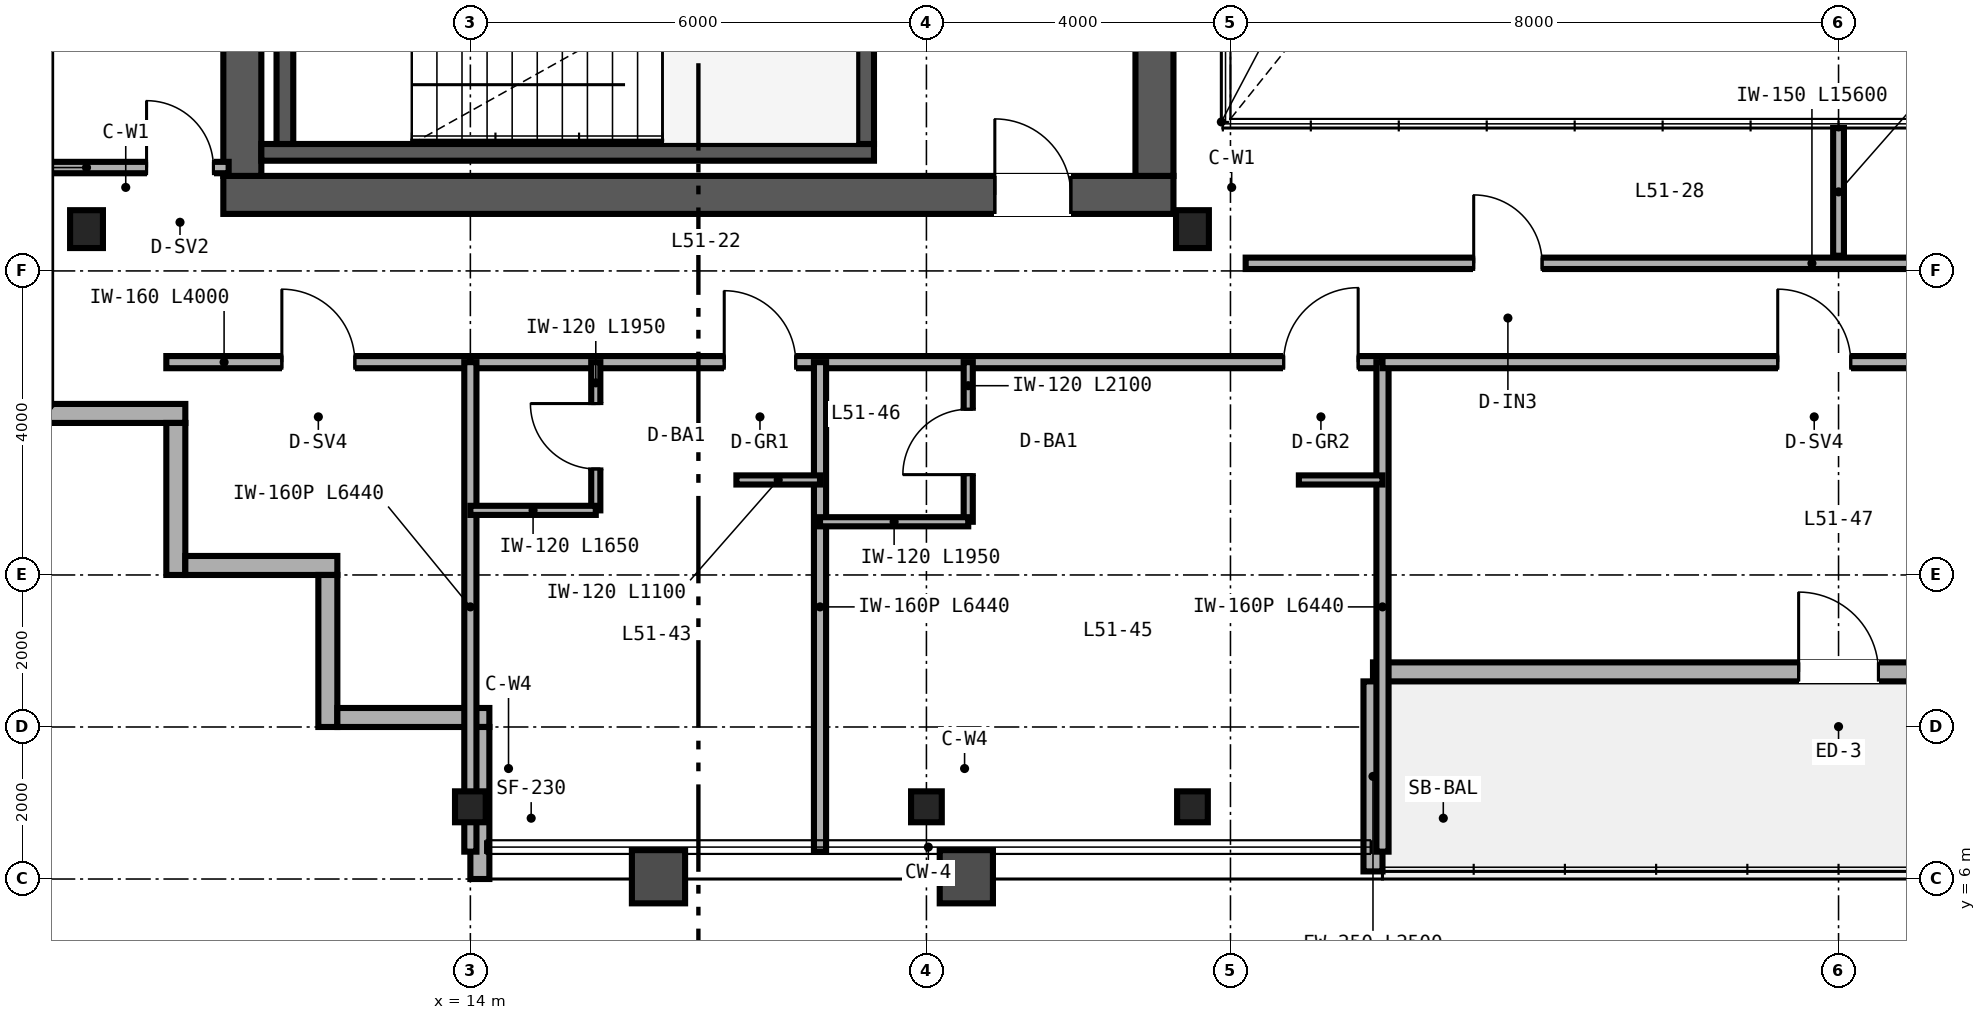
"""IFC4 building model, lengths in metres.
Left out: names, types, materials, properties, quantities, classifications, styles, units other than length and angle.
Written with IfcOpenShell. Run it as: python <this file> out.ifc"""

import sys

from ifc_helpers import new_model, si_unit, direction, frame, frame_2d, origin, origin_2d, place, context, subcontext, project, spatial, rectangle, i_section, extrude, source, transform, mapped, element, fill, save


model = new_model("IFC4")
c1 = context("Model", 3, precision=1e-05, world=origin(), true_north=direction((0.0, 1.0)))
c2 = subcontext(c1, "Body", "Model", "MODEL_VIEW")
j1 = project(units=[si_unit("LENGTHUNIT", "METRE"), si_unit("PLANEANGLEUNIT", "RADIAN")], contexts=[c1])
p1 = place(None, origin())
s1 = spatial("IfcSite", under=j1, at=p1, CompositionType="ELEMENT")
p2 = place(p1, origin())
s2 = spatial("IfcBuilding", under=s1, at=p2, CompositionType="ELEMENT")
p3 = place(p2, frame((0.0, 0.0, 202.8)))
s3 = spatial("IfcBuildingStorey", under=s2, at=p3, CompositionType="ELEMENT", Elevation=202.8)
p4 = place(p3, frame((10.75, 15.0, 0.0), z_axis=(0.0, 0.0, 1.0), x_axis=(1.0, 0.0, 0.0)))
e1 = element("IfcWall", 1, at=p4, inside=s3, PredefinedType="SHEAR", context=c2, shape_type="SweptSolid", body=[
    extrude(rectangle(XDim=12.5, YDim=0.5, at=frame_2d((6.25, 0.0))), origin(), (0.0, 0.0, 1.0), 3.37),
])
p5 = place(p4, frame((10.15, 0.0, 0.0)))
e2 = element("IfcOpeningElement", 2, at=p5, cuts=e1, PredefinedType="OPENING", context=c2, shape_type="SweptSolid", body=[
    extrude(rectangle(XDim=1.0, YDim=2.15, at=frame_2d((0.5, 1.075))), frame((0.0, 0.26, 0.0), z_axis=(0.0, -1.0, 0.0), x_axis=(1.0, 0.0, 0.0)), (0.0, 0.0, 1.0), 0.52),
])
for number, where, z_axis, x_axis in (
    (3, (11.0, 15.25, 0.0), (0.0, 0.0, 1.0), (0.0, 1.0, 0.0)),
    (4, (23.0, 15.25, 0.0), (0.0, 0.0, 1.0), (0.0, 1.0, 0.0)),
):
    element("IfcWall", number, at=place(p3, frame(where, z_axis=z_axis, x_axis=x_axis)), inside=s3, PredefinedType="SHEAR", context=c2, shape_type="SweptSolid", body=[
        extrude(rectangle(XDim=21.5, YDim=0.5, at=frame_2d((10.75, 0.0))), origin(), (0.0, 0.0, 1.0), 3.37),
    ])
p6 = place(p3, frame((11.25, 15.56, 0.0), z_axis=(0.0, 0.0, 1.0), x_axis=(1.0, 0.0, 0.0)))
e5 = element("IfcWall", 5, at=p6, inside=s3, PredefinedType="SHEAR", context=c2, shape_type="SweptSolid", body=[
    extrude(rectangle(XDim=8.06, YDim=0.22, at=frame_2d((4.03, 0.0))), origin(), (0.0, 0.0, 1.0), 3.4),
])
for number, where, z_axis, x_axis in (
    (6, (11.56, 15.67, 0.0), (0.0, 0.0, 1.0), (0.0, 1.0, 0.0)),
    (7, (19.2, 15.67, 0.0), (0.0, 0.0, 1.0), (0.0, 1.0, 0.0)),
):
    element("IfcWall", number, at=place(p3, frame(where, z_axis=z_axis, x_axis=x_axis)), inside=s3, PredefinedType="SHEAR", context=c2, shape_type="SweptSolid", body=[
        extrude(rectangle(XDim=3.28, YDim=0.22, at=frame_2d((1.64, 0.0))), origin(), (0.0, 0.0, 1.0), 3.4),
    ])
m1 = source(origin(), c2, "Body", "SweptSolid", [
    extrude(i_section(OverallWidth=0.432, OverallDepth=0.498, WebThickness=0.056, FlangeThickness=0.089, FilletRadius=0.025, at=origin_2d()), origin(), (0.0, 0.0, 1.0), 3.37),
])
for number, where, z_axis, x_axis in (
    (8, (8.95, 14.55, 0.0), (0.0, 0.0, 1.0), (1.0, 0.0, 0.0)),
    (9, (23.5, 14.55, 0.0), (0.0, 0.0, 1.0), (1.0, 0.0, 0.0)),
):
    element("IfcColumn", number, at=place(p3, frame(where, z_axis=z_axis, x_axis=x_axis)), inside=s3, PredefinedType="COLUMN", context=c2, shape_type="MappedRepresentation", body=[
        mapped(m1, transform((0.0, 0.0, 0.0), scale=1.0)),
    ])
m2 = source(origin(), c2, "Body", "SweptSolid", [
    extrude(i_section(OverallWidth=0.404, OverallDepth=0.407, WebThickness=0.027, FlangeThickness=0.044, FilletRadius=0.025, at=origin_2d()), origin(), (0.0, 0.0, 1.0), 3.37),
])
for number, where, z_axis, x_axis in (
    (10, (14.0, 6.95, 0.0), (0.0, 0.0, 1.0), (1.0, 0.0, 0.0)),
    (11, (20.0, 6.95, 0.0), (0.0, 0.0, 1.0), (1.0, 0.0, 0.0)),
    (12, (23.5, 6.95, 0.0), (0.0, 0.0, 1.0), (1.0, 0.0, 0.0)),
):
    element("IfcColumn", number, at=place(p3, frame(where, z_axis=z_axis, x_axis=x_axis)), inside=s3, PredefinedType="COLUMN", context=c2, shape_type="MappedRepresentation", body=[
        mapped(m2, transform((0.0, 0.0, 0.0), scale=1.0)),
    ])
p7 = place(p3, frame((8.0, 12.125, 0.0), z_axis=(0.0, 0.0, 1.0), x_axis=(1.0, 0.0, 0.0)))
e13 = element("IfcWall", 13, at=p7, inside=s3, PredefinedType="SOLIDWALL", context=c2, shape_type="SweptSolid", body=[
    extrude(rectangle(XDim=2.25, YDim=0.25, at=frame_2d((1.125, 0.0))), origin(), (0.0, 0.0, 1.0), 3.37),
])
for number, where, z_axis, x_axis in (
    (14, (10.125, 12.0, 0.0), (0.0, 0.0, 1.0), (0.0, -1.0, 0.0)),
    (15, (10.25, 10.125, 0.0), (0.0, 0.0, 1.0), (1.0, 0.0, 0.0)),
    (16, (12.125, 10.0, 0.0), (0.0, 0.0, 1.0), (0.0, -1.0, 0.0)),
    (17, (12.25, 8.125, 0.0), (0.0, 0.0, 1.0), (1.0, 0.0, 0.0)),
):
    element("IfcWall", number, at=place(p3, frame(where, z_axis=z_axis, x_axis=x_axis)), inside=s3, PredefinedType="SOLIDWALL", context=c2, shape_type="SweptSolid", body=[
        extrude(rectangle(XDim=2.0, YDim=0.25, at=frame_2d((1.0, 0.0))), origin(), (0.0, 0.0, 1.0), 3.37),
    ])
p8 = place(p3, frame((14.125, 8.0, 0.0), z_axis=(0.0, 0.0, 1.0), x_axis=(0.0, -1.0, 0.0)))
e18 = element("IfcWall", 18, at=p8, inside=s3, PredefinedType="SOLIDWALL", context=c2, shape_type="SweptSolid", body=[
    extrude(rectangle(XDim=2.0, YDim=0.25, at=frame_2d((1.0, 0.0))), origin(), (0.0, 0.0, 1.0), 2.677),
])
p9 = place(p3, frame((25.875, 8.725, 0.0), z_axis=(0.0, 0.0, 1.0), x_axis=(1.0, 0.0, 0.0)))
e19 = element("IfcWall", 19, at=p9, inside=s3, PredefinedType="SOLIDWALL", context=c2, shape_type="SweptSolid", body=[
    extrude(rectangle(XDim=12.25, YDim=0.25, at=frame_2d((6.125, 0.0))), origin(), (0.0, 0.0, 1.0), 3.37),
])
p10 = place(p9, frame((5.6, 0.0, 0.0)))
e20 = element("IfcOpeningElement", 20, at=p10, cuts=e19, PredefinedType="OPENING", context=c2, shape_type="SweptSolid", body=[
    extrude(rectangle(XDim=1.05, YDim=2.15, at=frame_2d((0.525, 1.075))), frame((0.0, 0.135, 0.0), z_axis=(0.0, -1.0, 0.0), x_axis=(1.0, 0.0, 0.0)), (0.0, 0.0, 1.0), 0.27),
])
p11 = place(p3, frame((25.875, 6.1, 0.0), z_axis=(0.0, 0.0, 1.0), x_axis=(0.0, 1.0, 0.0)))
e21 = element("IfcWall", 21, at=p11, inside=s3, PredefinedType="SOLIDWALL", context=c2, shape_type="SweptSolid", body=[
    extrude(rectangle(XDim=2.5, YDim=0.25, at=frame_2d((1.25, 0.0))), origin(), (0.0, 0.0, 1.0), 2.443),
])
p12 = place(p3, frame((24.2, 14.1, 0.0), z_axis=(0.0, 0.0, 1.0), x_axis=(1.0, 0.0, 0.0)))
e22 = element("IfcWall", 22, at=p12, inside=s3, PredefinedType="PARTITIONING", context=c2, shape_type="SweptSolid", body=[
    extrude(rectangle(XDim=15.6, YDim=0.15, at=frame_2d((7.8, 0.0))), origin(), (0.0, 0.0, 1.0), 3.37),
])
p13 = place(p12, frame((3.0, 0.0, 0.0)))
e23 = element("IfcOpeningElement", 23, at=p13, cuts=e22, PredefinedType="OPENING", context=c2, shape_type="SweptSolid", body=[
    extrude(rectangle(XDim=0.9, YDim=2.15, at=frame_2d((0.45, 1.075))), frame((0.0, 0.085, 0.0), z_axis=(0.0, -1.0, 0.0), x_axis=(1.0, 0.0, 0.0)), (0.0, 0.0, 1.0), 0.17),
])
p14 = place(p12, frame((11.0, 0.0, 0.0)))
e24 = element("IfcOpeningElement", 24, at=p14, cuts=e22, PredefinedType="OPENING", context=c2, shape_type="SweptSolid", body=[
    extrude(rectangle(XDim=0.9, YDim=2.15, at=frame_2d((0.45, 1.075))), frame((0.0, 0.085, 0.0), z_axis=(0.0, -1.0, 0.0), x_axis=(1.0, 0.0, 0.0)), (0.0, 0.0, 1.0), 0.17),
])
p15 = place(p3, frame((32.0, 14.2, 0.0), z_axis=(0.0, 0.0, 1.0), x_axis=(0.0, 1.0, 0.0)))
e25 = element("IfcWall", 25, at=p15, inside=s3, PredefinedType="PARTITIONING", context=c2, shape_type="SweptSolid", body=[
    extrude(rectangle(XDim=1.68, YDim=0.142, at=frame_2d((0.84, 0.0))), origin(), (0.0, 0.0, 1.0), 3.37),
])
p16 = place(p3, frame((8.16, 15.36, 0.0), z_axis=(0.0, 0.0, 1.0), x_axis=(1.0, 0.0, 0.0)))
e26 = element("IfcWall", 26, at=p16, inside=s3, PredefinedType="PARTITIONING", context=c2, shape_type="SweptSolid", body=[
    extrude(rectangle(XDim=2.66, YDim=0.15, at=frame_2d((1.33, 0.0))), origin(), (0.0, 0.0, 1.0), 2.591),
])
p17 = place(p16, frame((1.58, 0.0, 0.0)))
e27 = element("IfcOpeningElement", 27, at=p17, cuts=e26, PredefinedType="OPENING", context=c2, shape_type="SweptSolid", body=[
    extrude(rectangle(XDim=0.88, YDim=2.15, at=frame_2d((0.44, 1.075))), frame((0.0, 0.085, 0.0), z_axis=(0.0, -1.0, 0.0), x_axis=(1.0, 0.0, 0.0)), (0.0, 0.0, 1.0), 0.17),
])
p18 = place(p3, frame((10.0, 12.8, 0.0), z_axis=(0.0, 0.0, 1.0), x_axis=(1.0, 0.0, 0.0)))
e28 = element("IfcWall", 28, at=p18, inside=s3, PredefinedType="PARTITIONING", context=c2, shape_type="SweptSolid", body=[
    extrude(rectangle(XDim=4.0, YDim=0.16, at=frame_2d((2.0, 0.0))), origin(), (0.0, 0.0, 1.0), 3.37),
])
p19 = place(p18, frame((1.52, 0.0, 0.0)))
e29 = element("IfcOpeningElement", 29, at=p19, cuts=e28, PredefinedType="OPENING", context=c2, shape_type="SweptSolid", body=[
    extrude(rectangle(XDim=0.96, YDim=2.15, at=frame_2d((0.48, 1.075))), frame((0.0, 0.09, 0.0), z_axis=(0.0, -1.0, 0.0), x_axis=(1.0, 0.0, 0.0)), (0.0, 0.0, 1.0), 0.18),
])
p20 = place(p3, frame((14.0, 12.8, 0.0), z_axis=(0.0, 0.0, 1.0), x_axis=(1.0, 0.0, 0.0)))
e30 = element("IfcWall", 30, at=p20, inside=s3, PredefinedType="PARTITIONING", context=c2, shape_type="SweptSolid", body=[
    extrude(rectangle(XDim=12.0, YDim=0.16, at=frame_2d((6.0, 0.0))), origin(), (0.0, 0.0, 1.0), 2.913),
])
p21 = place(p20, frame((3.34, 0.0, 0.0)))
e31 = element("IfcOpeningElement", 31, at=p21, cuts=e30, PredefinedType="OPENING", context=c2, shape_type="SweptSolid", body=[
    extrude(rectangle(XDim=0.94, YDim=2.15, at=frame_2d((0.47, 1.075))), frame((0.0, 0.09, 0.0), z_axis=(0.0, -1.0, 0.0), x_axis=(1.0, 0.0, 0.0)), (0.0, 0.0, 1.0), 0.18),
])
p22 = place(p20, frame((10.7, 0.0, 0.0)))
e32 = element("IfcOpeningElement", 32, at=p22, cuts=e30, PredefinedType="OPENING", context=c2, shape_type="SweptSolid", body=[
    extrude(rectangle(XDim=0.98, YDim=2.2, at=frame_2d((0.49, 1.1))), frame((0.0, 0.09, 0.0), z_axis=(0.0, -1.0, 0.0), x_axis=(1.0, 0.0, 0.0)), (0.0, 0.0, 1.0), 0.18),
])
p23 = place(p3, frame((14.0, 6.36, 0.0), z_axis=(0.0, 0.0, 1.0), x_axis=(0.0, 1.0, 0.0)))
e33 = element("IfcWall", 33, at=p23, inside=s3, PredefinedType="PARTITIONING", context=c2, shape_type="SweptSolid", body=[
    extrude(rectangle(XDim=6.44, YDim=0.16, at=frame_2d((3.22, 0.0))), origin(), (0.0, 0.0, 1.0), 2.677),
])
p24 = place(p3, frame((26.0, 6.36, 0.0), z_axis=(0.0, 0.0, 1.0), x_axis=(0.0, 1.0, 0.0)))
e34 = element("IfcWall", 34, at=p24, inside=s3, PredefinedType="PARTITIONING", context=c2, shape_type="SweptSolid", body=[
    extrude(rectangle(XDim=6.44, YDim=0.16, at=frame_2d((3.22, 0.0))), origin(), (0.0, 0.0, 1.0), 2.443),
])
p25 = place(p3, frame((18.6, 6.36, 0.0), z_axis=(0.0, 0.0, 1.0), x_axis=(0.0, 1.0, 0.0)))
e35 = element("IfcWall", 35, at=p25, inside=s3, PredefinedType="PARTITIONING", context=c2, shape_type="SweptSolid", body=[
    extrude(rectangle(XDim=6.44, YDim=0.16, at=frame_2d((3.22, 0.0))), origin(), (0.0, 0.0, 1.0), 2.677),
])
p26 = place(p3, frame((15.65, 10.85, 0.0), z_axis=(0.0, 0.0, 1.0), x_axis=(0.0, 1.0, 0.0)))
e36 = element("IfcWall", 36, at=p26, inside=s3, PredefinedType="PARTITIONING", context=c2, shape_type="SweptSolid", body=[
    extrude(rectangle(XDim=1.95, YDim=0.12, at=frame_2d((0.975, 0.0))), origin(), (0.0, 0.0, 1.0), 3.37),
])
p27 = place(p26, frame((0.545, 0.0, 0.0)))
e37 = element("IfcOpeningElement", 37, at=p27, cuts=e36, PredefinedType="OPENING", context=c2, shape_type="SweptSolid", body=[
    extrude(rectangle(XDim=0.86, YDim=2.1, at=frame_2d((0.43, 1.05))), frame((0.0, 0.07, 0.0), z_axis=(0.0, -1.0, 0.0), x_axis=(1.0, 0.0, 0.0)), (0.0, 0.0, 1.0), 0.14),
])
p28 = place(p3, frame((14.0, 10.85, 0.0), z_axis=(0.0, 0.0, 1.0), x_axis=(1.0, 0.0, 0.0)))
e38 = element("IfcWall", 38, at=p28, inside=s3, PredefinedType="PARTITIONING", context=c2, shape_type="SweptSolid", body=[
    extrude(rectangle(XDim=1.65, YDim=0.12, at=frame_2d((0.825, 0.0))), origin(), (0.0, 0.0, 1.0), 3.37),
])
p29 = place(p3, frame((17.5, 11.25, 0.0), z_axis=(0.0, 0.0, 1.0), x_axis=(1.0, 0.0, 0.0)))
e39 = element("IfcWall", 39, at=p29, inside=s3, PredefinedType="PARTITIONING", context=c2, shape_type="SweptSolid", body=[
    extrude(rectangle(XDim=1.1, YDim=0.12, at=frame_2d((0.55, 0.0))), origin(), (0.0, 0.0, 1.0), 3.37),
])
p30 = place(p3, frame((20.55, 10.7, 0.0), z_axis=(0.0, 0.0, 1.0), x_axis=(0.0, 1.0, 0.0)))
e40 = element("IfcWall", 40, at=p30, inside=s3, PredefinedType="PARTITIONING", context=c2, shape_type="SweptSolid", body=[
    extrude(rectangle(XDim=2.1, YDim=0.12, at=frame_2d((1.05, 0.0))), origin(), (0.0, 0.0, 1.0), 3.37),
])
p31 = place(p30, frame((0.62, 0.0, 0.0)))
e41 = element("IfcOpeningElement", 41, at=p31, cuts=e40, PredefinedType="OPENING", context=c2, shape_type="SweptSolid", body=[
    extrude(rectangle(XDim=0.86, YDim=2.1, at=frame_2d((0.43, 1.05))), frame((0.0, 0.07, 0.0), z_axis=(0.0, -1.0, 0.0), x_axis=(1.0, 0.0, 0.0)), (0.0, 0.0, 1.0), 0.14),
])
p32 = place(p3, frame((18.6, 10.7, 0.0), z_axis=(0.0, 0.0, 1.0), x_axis=(1.0, 0.0, 0.0)))
e42 = element("IfcWall", 42, at=p32, inside=s3, PredefinedType="PARTITIONING", context=c2, shape_type="SweptSolid", body=[
    extrude(rectangle(XDim=1.95, YDim=0.12, at=frame_2d((0.975, 0.0))), origin(), (0.0, 0.0, 1.0), 3.37),
])
p33 = place(p3, frame((24.9, 11.25, 0.0), z_axis=(0.0, 0.0, 1.0), x_axis=(1.0, 0.0, 0.0)))
e43 = element("IfcWall", 43, at=p33, inside=s3, PredefinedType="PARTITIONING", context=c2, shape_type="SweptSolid", body=[
    extrude(rectangle(XDim=1.1, YDim=0.12, at=frame_2d((0.55, 0.0))), origin(), (0.0, 0.0, 1.0), 3.37),
])
p34 = place(p3, frame((26.0, 12.8, 0.0), z_axis=(0.0, 0.0, 1.0), x_axis=(1.0, 0.0, 0.0)))
e44 = element("IfcWall", 44, at=p34, inside=s3, PredefinedType="PARTITIONING", context=c2, shape_type="SweptSolid", body=[
    extrude(rectangle(XDim=12.0, YDim=0.16, at=frame_2d((6.0, 0.0))), origin(), (0.0, 0.0, 1.0), 3.37),
])
p35 = place(p34, frame((5.2, 0.0, 0.0)))
e45 = element("IfcOpeningElement", 45, at=p35, cuts=e44, PredefinedType="OPENING", context=c2, shape_type="SweptSolid", body=[
    extrude(rectangle(XDim=0.96, YDim=2.15, at=frame_2d((0.48, 1.075))), frame((0.0, 0.09, 0.0), z_axis=(0.0, -1.0, 0.0), x_axis=(1.0, 0.0, 0.0)), (0.0, 0.0, 1.0), 0.18),
])
m3 = source(origin(), c2, "Body", "SweptSolid", [
    extrude(rectangle(XDim=1.05, YDim=2.15, at=frame_2d((0.525, 1.075))), frame((0.0, 0.025, 0.0), z_axis=(0.0, -1.0, 0.0), x_axis=(1.0, 0.0, 0.0)), (0.0, 0.0, 1.0), 0.05),
])
p36 = place(p10, origin())
e46 = element("IfcDoor", 46, at=p36, inside=s3, OperationType="SINGLE_SWING_LEFT", PredefinedType="DOOR", context=c2, shape_type="MappedRepresentation", body=[
    mapped(m3, transform((0.0, 0.0, 0.0), scale=1.0)),
])
fill(e20, e46)
m4 = source(origin(), c2, "Body", "SweptSolid", [
    extrude(rectangle(XDim=1.0, YDim=2.15, at=frame_2d((0.5, 1.075))), frame((0.0, 0.025, 0.0), z_axis=(0.0, -1.0, 0.0), x_axis=(1.0, 0.0, 0.0)), (0.0, 0.0, 1.0), 0.05),
])
p37 = place(p5, origin())
e47 = element("IfcDoor", 47, at=p37, inside=s3, OperationType="SINGLE_SWING_LEFT", PredefinedType="DOOR", context=c2, shape_type="MappedRepresentation", body=[
    mapped(m4, transform((0.0, 0.0, 0.0), scale=1.0)),
])
fill(e2, e47)
m5 = source(origin(), c2, "Body", "SweptSolid", [
    extrude(rectangle(XDim=0.9, YDim=2.15, at=frame_2d((0.45, 1.075))), frame((0.0, 0.025, 0.0), z_axis=(0.0, -1.0, 0.0), x_axis=(1.0, 0.0, 0.0)), (0.0, 0.0, 1.0), 0.05),
])
p38 = place(p13, origin())
e48 = element("IfcDoor", 48, at=p38, inside=s3, OperationType="SINGLE_SWING_LEFT", PredefinedType="DOOR", context=c2, shape_type="MappedRepresentation", body=[
    mapped(m5, transform((0.0, 0.0, 0.0), scale=1.0)),
])
fill(e23, e48)
m6 = source(origin(), c2, "Body", "SweptSolid", [
    extrude(rectangle(XDim=0.88, YDim=2.15, at=frame_2d((0.44, 1.075))), frame((0.0, 0.025, 0.0), z_axis=(0.0, -1.0, 0.0), x_axis=(1.0, 0.0, 0.0)), (0.0, 0.0, 1.0), 0.05),
])
p39 = place(p17, origin())
e49 = element("IfcDoor", 49, at=p39, inside=s3, OperationType="SINGLE_SWING_LEFT", PredefinedType="DOOR", context=c2, shape_type="MappedRepresentation", body=[
    mapped(m6, transform((0.0, 0.0, 0.0), scale=1.0)),
])
fill(e27, e49)
m7 = source(origin(), c2, "Body", "SweptSolid", [
    extrude(rectangle(XDim=0.96, YDim=2.15, at=frame_2d((0.48, 1.075))), frame((0.0, 0.025, 0.0), z_axis=(0.0, -1.0, 0.0), x_axis=(1.0, 0.0, 0.0)), (0.0, 0.0, 1.0), 0.05),
])
p40 = place(p19, origin())
e50 = element("IfcDoor", 50, at=p40, inside=s3, OperationType="SINGLE_SWING_LEFT", PredefinedType="DOOR", context=c2, shape_type="MappedRepresentation", body=[
    mapped(m7, transform((0.0, 0.0, 0.0), scale=1.0)),
])
fill(e29, e50)
m8 = source(origin(), c2, "Body", "SweptSolid", [
    extrude(rectangle(XDim=0.86, YDim=2.1, at=frame_2d((0.43, 1.05))), frame((0.0, 0.025, 0.0), z_axis=(0.0, -1.0, 0.0), x_axis=(1.0, 0.0, 0.0)), (0.0, 0.0, 1.0), 0.05),
])
p41 = place(p27, origin())
e51 = element("IfcDoor", 51, at=p41, inside=s3, OperationType="SINGLE_SWING_RIGHT", PredefinedType="DOOR", context=c2, shape_type="MappedRepresentation", body=[
    mapped(m8, transform((0.0, 0.0, 0.0), scale=1.0)),
])
fill(e37, e51)
p42 = place(p31, origin())
e52 = element("IfcDoor", 52, at=p42, inside=s3, OperationType="SINGLE_SWING_LEFT", PredefinedType="DOOR", context=c2, shape_type="MappedRepresentation", body=[
    mapped(m8, transform((0.0, 0.0, 0.0), scale=1.0)),
])
fill(e41, e52)
m9 = source(origin(), c2, "Body", "SweptSolid", [
    extrude(rectangle(XDim=0.94, YDim=2.15, at=frame_2d((0.47, 1.075))), frame((0.0, 0.025, 0.0), z_axis=(0.0, -1.0, 0.0), x_axis=(1.0, 0.0, 0.0)), (0.0, 0.0, 1.0), 0.05),
])
p43 = place(p21, origin())
e53 = element("IfcDoor", 53, at=p43, inside=s3, OperationType="SINGLE_SWING_LEFT", PredefinedType="DOOR", context=c2, shape_type="MappedRepresentation", body=[
    mapped(m9, transform((0.0, 0.0, 0.0), scale=1.0)),
])
fill(e31, e53)
m10 = source(origin(), c2, "Body", "SweptSolid", [
    extrude(rectangle(XDim=0.98, YDim=2.2, at=frame_2d((0.49, 1.1))), frame((0.0, 0.025, 0.0), z_axis=(0.0, -1.0, 0.0), x_axis=(1.0, 0.0, 0.0)), (0.0, 0.0, 1.0), 0.05),
])
p44 = place(p22, origin())
e54 = element("IfcDoor", 54, at=p44, inside=s3, OperationType="SINGLE_SWING_RIGHT", PredefinedType="DOOR", context=c2, shape_type="MappedRepresentation", body=[
    mapped(m10, transform((0.0, 0.0, 0.0), scale=1.0)),
])
fill(e32, e54)
p45 = place(p35, origin())
e55 = element("IfcDoor", 55, at=p45, inside=s3, OperationType="SINGLE_SWING_LEFT", PredefinedType="DOOR", context=c2, shape_type="MappedRepresentation", body=[
    mapped(m7, transform((0.0, 0.0, 0.0), scale=1.0)),
])
fill(e45, e55)
save(model, sys.argv[1])
